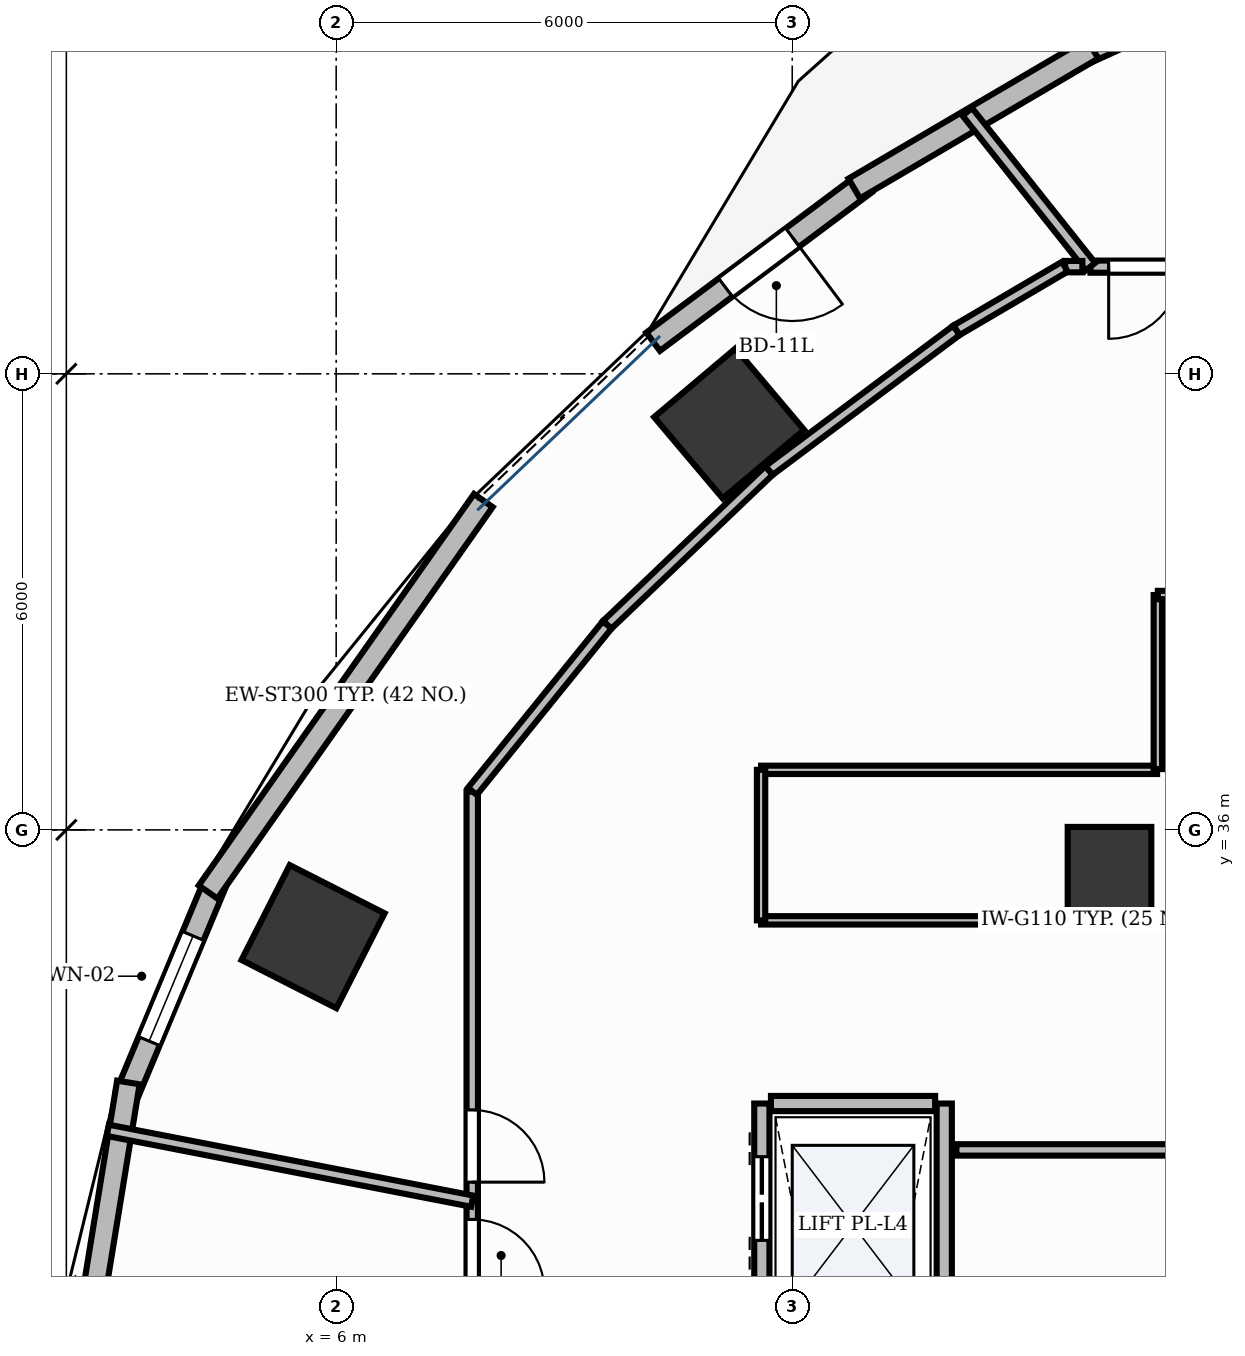
"""IFC4 building model, lengths in metres.
Left out: names, types, materials, properties, quantities, classifications, styles, units other than length and angle.
Written with IfcOpenShell. Run it as: python <this file> out.ifc"""

import sys

from ifc_helpers import new_model, si_unit, direction, frame, frame_2d, origin, origin_2d, place, context, subcontext, project, spatial, rectangle, extrude, element, fill, save


model = new_model("IFC4")
c1 = context("Model", 3, precision=1e-05, world=origin(), true_north=direction((0.0, 1.0)))
c2 = subcontext(c1, "Body", "Model", "MODEL_VIEW")
j1 = project(units=[si_unit("LENGTHUNIT", "METRE"), si_unit("PLANEANGLEUNIT", "RADIAN")], contexts=[c1])
p1 = place(None, origin())
s1 = spatial("IfcSite", under=j1, at=p1, CompositionType="ELEMENT")
p2 = place(p1, origin())
s2 = spatial("IfcBuilding", under=s1, at=p2, CompositionType="ELEMENT")
p3 = place(p2, frame((0.0, 0.0, 72.0)))
s3 = spatial("IfcBuildingStorey", under=s2, at=p3, CompositionType="ELEMENT", Elevation=72.0)
for number, where, z_axis, x_axis in (
    (1, (11.17, 41.347, -0.0), (0.0, 0.0, 1.0), (0.764, 0.645, 0.0)),
    (2, (5.696, 34.596, -0.0), (0.0, 0.0, 1.0), (0.453, 0.891, 0.0)),
):
    element("IfcColumn", number, at=place(p3, frame(where, z_axis=z_axis, x_axis=x_axis)), inside=s3, PredefinedType="COLUMN", context=c2, shape_type="SweptSolid", body=[
        extrude(rectangle(XDim=1.4, YDim=1.4, at=origin_2d()), origin(), (0.0, 0.0, 1.0), 3.901),
    ])
p4 = place(p3, frame((16.174, 35.489, -0.0), z_axis=(0.0, 0.0, 1.0), x_axis=(1.0, 0.0, 0.0)))
e3 = element("IfcColumn", 3, at=p4, inside=s3, PredefinedType="COLUMN", context=c2, shape_type="SweptSolid", body=[
    extrude(rectangle(XDim=1.1, YDim=1.1, at=origin_2d()), origin(), (0.0, 0.0, 1.0), 3.901),
])
p5 = place(p3, frame((12.957, 44.507, 0.0), z_axis=(0.0, 0.0, 1.0), x_axis=(-0.800798896088, -0.59893332519, 0.0)))
e4 = element("IfcWall", 4, at=p5, inside=s3, PredefinedType="STANDARD", context=c2, shape_type="SweptSolid", body=[
    extrude(rectangle(XDim=3.481, YDim=0.3, at=frame_2d((1.74, 0.0))), origin(), (0.0, 0.0, 1.0), 3.9),
])
p6 = place(p5, frame((1.19, 0.0, 0.0)))
e5 = element("IfcOpeningElement", 5, at=p6, cuts=e4, PredefinedType="OPENING", context=c2, shape_type="SweptSolid", body=[
    extrude(rectangle(XDim=1.1, YDim=2.15, at=frame_2d((0.55, 1.075))), frame((0.0, 0.165, 0.0), z_axis=(0.0, -1.0, 0.0), x_axis=(1.0, 0.0, 0.0)), (0.0, 0.0, 1.0), 0.33),
])
p7 = place(p3, frame((4.417, 35.323, 0.0), z_axis=(0.0, 0.0, 1.0), x_axis=(-0.385358473275, -0.92276695166, 0.0)))
e6 = element("IfcWall", 6, at=p7, inside=s3, PredefinedType="STANDARD", context=c2, shape_type="SweptSolid", body=[
    extrude(rectangle(XDim=3.056, YDim=0.3, at=frame_2d((1.528, 0.0))), origin(), (0.0, 0.0, 1.0), 3.47),
])
p8 = place(p7, frame((0.778, 0.0, 0.95)))
e7 = element("IfcOpeningElement", 7, at=p8, cuts=e6, PredefinedType="OPENING", context=c2, shape_type="SweptSolid", body=[
    extrude(rectangle(XDim=1.5, YDim=1.8, at=frame_2d((0.75, 0.9))), frame((0.0, 0.165, 0.0), z_axis=(0.0, -1.0, 0.0), x_axis=(1.0, 0.0, 0.0)), (0.0, 0.0, 1.0), 0.33),
])
p9 = place(p3, frame((19.201, 47.743, 0.0), z_axis=(0.0, 0.0, 1.0), x_axis=(-0.910623406862, -0.413237233166, 0.0)))
e8 = element("IfcWall", 8, at=p9, inside=s3, PredefinedType="STANDARD", context=c2, shape_type="SweptSolid", body=[
    extrude(rectangle(XDim=3.74, YDim=0.3, at=frame_2d((1.87, 0.0))), origin(), (0.0, 0.0, 1.0), 3.9),
])
p10 = place(p3, frame((15.951, 46.278, 0.0), z_axis=(0.0, 0.0, 1.0), x_axis=(-0.8624654944, -0.506115867139, 0.0)))
e9 = element("IfcWall", 9, at=p10, inside=s3, PredefinedType="STANDARD", context=c2, shape_type="SweptSolid", body=[
    extrude(rectangle(XDim=3.635, YDim=0.3, at=frame_2d((1.818, 0.0))), origin(), (0.0, 0.0, 1.0), 3.9),
])
p11 = place(p3, frame((7.936, 40.333, 0.0), z_axis=(0.0, 0.0, 1.0), x_axis=(-0.575165804445, -0.818036855769, 0.0)))
e10 = element("IfcWall", 10, at=p11, inside=s3, PredefinedType="STANDARD", context=c2, shape_type="SweptSolid", body=[
    extrude(rectangle(XDim=6.296, YDim=0.3, at=frame_2d((3.148, 0.0))), origin(), (0.0, 0.0, 1.0), 3.9),
])
p12 = place(p3, frame((3.266, 32.677, 0.0), z_axis=(0.0, 0.0, 1.0), x_axis=(-0.160712446639, -0.987001271273, 0.0)))
e11 = element("IfcWall", 11, at=p12, inside=s3, PredefinedType="STANDARD", context=c2, shape_type="SweptSolid", body=[
    extrude(rectangle(XDim=5.855, YDim=0.3, at=frame_2d((2.927, 0.0))), origin(), (0.0, 0.0, 1.0), 3.47),
])
p13 = place(p3, frame((11.6, 21.6, 0.0), z_axis=(0.0, 0.0, 1.0), x_axis=(0.0, 1.0, 0.0)))
e12 = element("IfcWall", 12, at=p13, inside=s3, PredefinedType="PARTITIONING", context=c2, shape_type="SweptSolid", body=[
    extrude(rectangle(XDim=10.8, YDim=0.2, at=frame_2d((5.4, 0.0))), origin(), (0.0, 0.0, 1.0), 2.91),
])
p14 = place(p13, frame((0.9, 0.0, 0.0)))
e13 = element("IfcOpeningElement", 13, at=p14, cuts=e12, PredefinedType="OPENING", context=c2, shape_type="SweptSolid", body=[
    extrude(rectangle(XDim=1.1, YDim=2.2, at=frame_2d((0.55, 1.1))), frame((0.0, 0.115, 0.0), z_axis=(0.0, -1.0, 0.0), x_axis=(1.0, 0.0, 0.0)), (0.0, 0.0, 1.0), 0.23),
])
p15 = place(p13, frame((3.6, 0.0, 0.0)))
e14 = element("IfcOpeningElement", 14, at=p15, cuts=e12, PredefinedType="OPENING", context=c2, shape_type="SweptSolid", body=[
    extrude(rectangle(XDim=1.1, YDim=2.2, at=frame_2d((0.55, 1.1))), frame((0.0, 0.115, 0.0), z_axis=(0.0, -1.0, 0.0), x_axis=(1.0, 0.0, 0.0)), (0.0, 0.0, 1.0), 0.23),
])
p16 = place(p13, frame((6.3, 0.0, 0.0)))
e15 = element("IfcOpeningElement", 15, at=p16, cuts=e12, PredefinedType="OPENING", context=c2, shape_type="SweptSolid", body=[
    extrude(rectangle(XDim=1.1, YDim=2.2, at=frame_2d((0.55, 1.1))), frame((0.0, 0.115, 0.0), z_axis=(0.0, -1.0, 0.0), x_axis=(1.0, 0.0, 0.0)), (0.0, 0.0, 1.0), 0.23),
])
p17 = place(p13, frame((9.0, 0.0, 0.0)))
e16 = element("IfcOpeningElement", 16, at=p17, cuts=e12, PredefinedType="OPENING", context=c2, shape_type="SweptSolid", body=[
    extrude(rectangle(XDim=1.1, YDim=2.2, at=frame_2d((0.55, 1.1))), frame((0.0, 0.115, 0.0), z_axis=(0.0, -1.0, 0.0), x_axis=(1.0, 0.0, 0.0)), (0.0, 0.0, 1.0), 0.23),
])
p18 = place(p3, frame((14.0, 21.6, 0.0), z_axis=(0.0, 0.0, 1.0), x_axis=(0.0, 1.0, 0.0)))
e17 = element("IfcWall", 17, at=p18, inside=s3, PredefinedType="PARTITIONING", context=c2, shape_type="SweptSolid", body=[
    extrude(rectangle(XDim=10.8, YDim=0.2, at=frame_2d((5.4, 0.0))), origin(), (0.0, 0.0, 1.0), 2.91),
])
p19 = place(p3, frame((11.72, 32.4, 0.0), z_axis=(0.0, 0.0, 1.0), x_axis=(1.0, 0.0, 0.0)))
e18 = element("IfcWall", 18, at=p19, inside=s3, PredefinedType="PARTITIONING", context=c2, shape_type="SweptSolid", body=[
    extrude(rectangle(XDim=2.16, YDim=0.2, at=frame_2d((1.08, 0.0))), origin(), (0.0, 0.0, 1.0), 2.91),
])
p20 = place(p3, frame((7.79, 31.115, 0.0), z_axis=(0.0, 0.0, 1.0), x_axis=(0.0, -1.0, 0.0)))
e19 = element("IfcWall", 19, at=p20, inside=s3, PredefinedType="PARTITIONING", context=c2, shape_type="SweptSolid", body=[
    extrude(rectangle(XDim=13.617, YDim=0.15, at=frame_2d((6.808, 0.0))), origin(), (0.0, 0.0, 1.0), 2.91),
])
p21 = place(p20, frame((0.24, 0.0, 0.0)))
e20 = element("IfcOpeningElement", 20, at=p21, cuts=e19, PredefinedType="OPENING", context=c2, shape_type="SweptSolid", body=[
    extrude(rectangle(XDim=0.95, YDim=2.15, at=frame_2d((0.475, 1.075))), frame((0.0, 0.09, 0.0), z_axis=(0.0, -1.0, 0.0), x_axis=(1.0, 0.0, 0.0)), (0.0, 0.0, 1.0), 0.18),
])
p22 = place(p3, frame((30.922, 43.41, 0.0), z_axis=(0.0, 0.0, 1.0), x_axis=(-1.0, 0.0, 0.0)))
e21 = element("IfcWall", 21, at=p22, inside=s3, PredefinedType="PARTITIONING", context=c2, shape_type="SweptSolid", body=[
    extrude(rectangle(XDim=14.999, YDim=0.16, at=frame_2d((7.5, 0.0))), origin(), (0.0, 0.0, 1.0), 2.91),
])
p23 = place(p22, frame((13.809, 0.0, 0.0)))
e22 = element("IfcOpeningElement", 22, at=p23, cuts=e21, PredefinedType="OPENING", context=c2, shape_type="SweptSolid", body=[
    extrude(rectangle(XDim=0.95, YDim=2.15, at=frame_2d((0.475, 1.075))), frame((0.0, 0.095, 0.0), z_axis=(0.0, -1.0, 0.0), x_axis=(1.0, 0.0, 0.0)), (0.0, 0.0, 1.0), 0.19),
])
p24 = place(p3, frame((21.74, 34.81, 0.0), z_axis=(0.0, 0.0, 1.0), x_axis=(-1.0, 0.0, 0.0)))
e23 = element("IfcWall", 23, at=p24, inside=s3, PredefinedType="MOVABLE", context=c2, shape_type="SweptSolid", body=[
    extrude(rectangle(XDim=10.15, YDim=0.11, at=frame_2d((5.075, 0.0))), origin(), (0.0, 0.0, 1.0), 2.91),
])
p25 = place(p24, frame((0.24, 0.0, 0.0)))
e24 = element("IfcOpeningElement", 24, at=p25, cuts=e23, PredefinedType="OPENING", context=c2, shape_type="SweptSolid", body=[
    extrude(rectangle(XDim=0.95, YDim=2.15, at=frame_2d((0.475, 1.075))), frame((0.0, 0.07, 0.0), z_axis=(0.0, -1.0, 0.0), x_axis=(1.0, 0.0, 0.0)), (0.0, 0.0, 1.0), 0.14),
])
p26 = place(p3, frame((7.79, 36.501, 0.0), z_axis=(0.0, 0.0, 1.0), x_axis=(0.0, -1.0, 0.0)))
e25 = element("IfcWall", 25, at=p26, inside=s3, PredefinedType="PARTITIONING", context=c2, shape_type="SweptSolid", body=[
    extrude(rectangle(XDim=5.375, YDim=0.15, at=frame_2d((2.688, 0.0))), origin(), (0.0, 0.0, 1.0), 2.91),
])
p27 = place(p26, frame((4.185, 0.0, 0.0)))
e26 = element("IfcOpeningElement", 26, at=p27, cuts=e25, PredefinedType="OPENING", context=c2, shape_type="SweptSolid", body=[
    extrude(rectangle(XDim=0.95, YDim=2.15, at=frame_2d((0.475, 1.075))), frame((0.0, 0.09, 0.0), z_axis=(0.0, -1.0, 0.0), x_axis=(1.0, 0.0, 0.0)), (0.0, 0.0, 1.0), 0.18),
])
p28 = place(p3, frame((14.16, 31.79, 0.0), z_axis=(0.0, 0.0, 1.0), x_axis=(1.0, 0.0, 0.0)))
e27 = element("IfcWall", 27, at=p28, inside=s3, PredefinedType="PARTITIONING", context=c2, shape_type="SweptSolid", body=[
    extrude(rectangle(XDim=5.18, YDim=0.15, at=frame_2d((2.59, 0.0))), origin(), (0.0, 0.0, 1.0), 2.91),
])
p29 = place(p3, frame((2.995, 32.048, 0.0), z_axis=(0.0, 0.0, 1.0), x_axis=(0.981623712682, -0.190826850052, 0.0)))
e28 = element("IfcWall", 28, at=p29, inside=s3, PredefinedType="PARTITIONING", context=c2, shape_type="SweptSolid", body=[
    extrude(rectangle(XDim=4.885, YDim=0.15, at=frame_2d((2.442, 0.0))), origin(), (0.0, 0.0, 1.0), 2.91),
])
p30 = place(p3, frame((15.923, 43.41, 0.0), z_axis=(0.0, 0.0, 1.0), x_axis=(-0.622507898818, 0.782613516309, 0.0)))
e29 = element("IfcWall", 29, at=p30, inside=s3, PredefinedType="PARTITIONING", context=c2, shape_type="SweptSolid", body=[
    extrude(rectangle(XDim=2.603, YDim=0.16, at=frame_2d((1.302, 0.0))), origin(), (0.0, 0.0, 1.0), 2.91),
])
p31 = place(p3, frame((11.59, 36.79, 0.0), z_axis=(0.0, 0.0, 1.0), x_axis=(1.0, 0.0, 0.0)))
e30 = element("IfcWall", 30, at=p31, inside=s3, PredefinedType="MOVABLE", context=c2, shape_type="SweptSolid", body=[
    extrude(rectangle(XDim=5.21, YDim=0.11, at=frame_2d((2.605, 0.0))), origin(), (0.0, 0.0, 1.0), 2.91),
])
p32 = place(p3, frame((16.81, 36.8, 0.0), z_axis=(0.0, 0.0, 1.0), x_axis=(0.0, 1.0, 0.0)))
e31 = element("IfcWall", 31, at=p32, inside=s3, PredefinedType="MOVABLE", context=c2, shape_type="SweptSolid", body=[
    extrude(rectangle(XDim=2.29, YDim=0.11, at=frame_2d((1.145, 0.0))), origin(), (0.0, 0.0, 1.0), 2.91),
])
p33 = place(p3, frame((16.81, 39.09, 0.0), z_axis=(0.0, 0.0, 1.0), x_axis=(1.0, 0.0, 0.0)))
e32 = element("IfcWall", 32, at=p33, inside=s3, PredefinedType="MOVABLE", context=c2, shape_type="SweptSolid", body=[
    extrude(rectangle(XDim=4.93, YDim=0.11, at=frame_2d((2.465, 0.0))), origin(), (0.0, 0.0, 1.0), 2.91),
])
p34 = place(p3, frame((11.59, 34.81, 0.0), z_axis=(0.0, 0.0, 1.0), x_axis=(0.0, 1.0, 0.0)))
e33 = element("IfcWall", 33, at=p34, inside=s3, PredefinedType="MOVABLE", context=c2, shape_type="SweptSolid", body=[
    extrude(rectangle(XDim=1.98, YDim=0.11, at=frame_2d((0.99, 0.0))), origin(), (0.0, 0.0, 1.0), 2.91),
])
p35 = place(p3, frame((15.817, 43.41, 0.0), z_axis=(0.0, 0.0, 1.0), x_axis=(-1.0, 0.0, 0.0)))
e34 = element("IfcWall", 34, at=p35, inside=s3, PredefinedType="PARTITIONING", context=c2, shape_type="SweptSolid", body=[
    extrude(rectangle(XDim=0.226, YDim=0.15, at=frame_2d((0.113, 0.0))), origin(), (0.0, 0.0, 1.0), 2.91),
])
p36 = place(p3, frame((15.586, 43.409, 0.0), z_axis=(0.0, 0.0, 1.0), x_axis=(-0.862446636904, -0.506148000582, 0.0)))
e35 = element("IfcWall", 35, at=p36, inside=s3, PredefinedType="PARTITIONING", context=c2, shape_type="SweptSolid", body=[
    extrude(rectangle(XDim=1.652, YDim=0.15, at=frame_2d((0.826, 0.0))), origin(), (0.0, 0.0, 1.0), 2.91),
])
p37 = place(p3, frame((14.16, 42.572, 0.0), z_axis=(0.0, 0.0, 1.0), x_axis=(-0.800808090092, -0.598921032227, 0.0)))
e36 = element("IfcWall", 36, at=p37, inside=s3, PredefinedType="PARTITIONING", context=c2, shape_type="SweptSolid", body=[
    extrude(rectangle(XDim=3.079, YDim=0.15, at=frame_2d((1.54, 0.0))), origin(), (0.0, 0.0, 1.0), 2.91),
])
p38 = place(p3, frame((11.693, 40.727, 0.0), z_axis=(0.0, 0.0, 1.0), x_axis=(-0.723683526017, -0.690131983154, 0.0)))
e37 = element("IfcWall", 37, at=p38, inside=s3, PredefinedType="PARTITIONING", context=c2, shape_type="SweptSolid", body=[
    extrude(rectangle(XDim=2.94, YDim=0.15, at=frame_2d((1.47, 0.0))), origin(), (0.0, 0.0, 1.0), 2.91),
])
p39 = place(p3, frame((9.565, 38.697, 0.0), z_axis=(0.0, 0.0, 1.0), x_axis=(-0.629270515505, -0.777186347227, 0.0)))
e38 = element("IfcWall", 38, at=p39, inside=s3, PredefinedType="PARTITIONING", context=c2, shape_type="SweptSolid", body=[
    extrude(rectangle(XDim=2.817, YDim=0.15, at=frame_2d((1.409, 0.0))), origin(), (0.0, 0.0, 1.0), 2.91),
])
p40 = place(p6, origin())
e39 = element("IfcDoor", 39, at=p40, inside=s3, OperationType="SINGLE_SWING_LEFT", PredefinedType="DOOR", context=c2, shape_type="SweptSolid", body=[
    extrude(rectangle(XDim=1.1, YDim=2.15, at=frame_2d((0.55, 1.075))), frame((0.0, 0.025, 0.0), z_axis=(0.0, -1.0, 0.0), x_axis=(1.0, 0.0, 0.0)), (0.0, 0.0, 1.0), 0.05),
])
fill(e5, e39)
p41 = place(p8, origin())
e40 = element("IfcWindow", 40, at=p41, inside=s3, PartitioningType="DOUBLE_PANEL_VERTICAL", PredefinedType="WINDOW", context=c2, shape_type="SweptSolid", body=[
    extrude(rectangle(XDim=1.5, YDim=1.8, at=frame_2d((0.75, 0.9))), frame((0.0, 0.03, 0.0), z_axis=(0.0, -1.0, 0.0), x_axis=(1.0, 0.0, 0.0)), (0.0, 0.0, 1.0), 0.06),
])
fill(e7, e40)
p42 = place(p17, origin())
e41 = element("IfcDoor", 41, at=p42, inside=s3, OperationType="DOUBLE_DOOR_SLIDING", PredefinedType="DOOR", context=c2, shape_type="SweptSolid", body=[
    extrude(rectangle(XDim=1.1, YDim=2.2, at=frame_2d((0.55, 1.1))), frame((0.0, 0.025, 0.0), z_axis=(0.0, -1.0, 0.0), x_axis=(1.0, 0.0, 0.0)), (0.0, 0.0, 1.0), 0.05),
])
fill(e16, e41)
p43 = place(p21, origin())
e42 = element("IfcDoor", 42, at=p43, inside=s3, OperationType="SINGLE_SWING_RIGHT", PredefinedType="DOOR", context=c2, shape_type="SweptSolid", body=[
    extrude(rectangle(XDim=0.95, YDim=2.15, at=frame_2d((0.475, 1.075))), frame((0.0, 0.025, 0.0), z_axis=(0.0, -1.0, 0.0), x_axis=(1.0, 0.0, 0.0)), (0.0, 0.0, 1.0), 0.05),
])
fill(e20, e42)
p44 = place(p23, origin())
e43 = element("IfcDoor", 43, at=p44, inside=s3, OperationType="SINGLE_SWING_RIGHT", PredefinedType="DOOR", context=c2, shape_type="SweptSolid", body=[
    extrude(rectangle(XDim=0.95, YDim=2.15, at=frame_2d((0.475, 1.075))), frame((0.0, 0.025, 0.0), z_axis=(0.0, -1.0, 0.0), x_axis=(1.0, 0.0, 0.0)), (0.0, 0.0, 1.0), 0.05),
])
fill(e22, e43)
p45 = place(p27, origin())
e44 = element("IfcDoor", 44, at=p45, inside=s3, OperationType="SINGLE_SWING_RIGHT", PredefinedType="DOOR", context=c2, shape_type="SweptSolid", body=[
    extrude(rectangle(XDim=0.95, YDim=2.15, at=frame_2d((0.475, 1.075))), frame((0.0, 0.025, 0.0), z_axis=(0.0, -1.0, 0.0), x_axis=(1.0, 0.0, 0.0)), (0.0, 0.0, 1.0), 0.05),
])
fill(e26, e44)
save(model, sys.argv[1])
